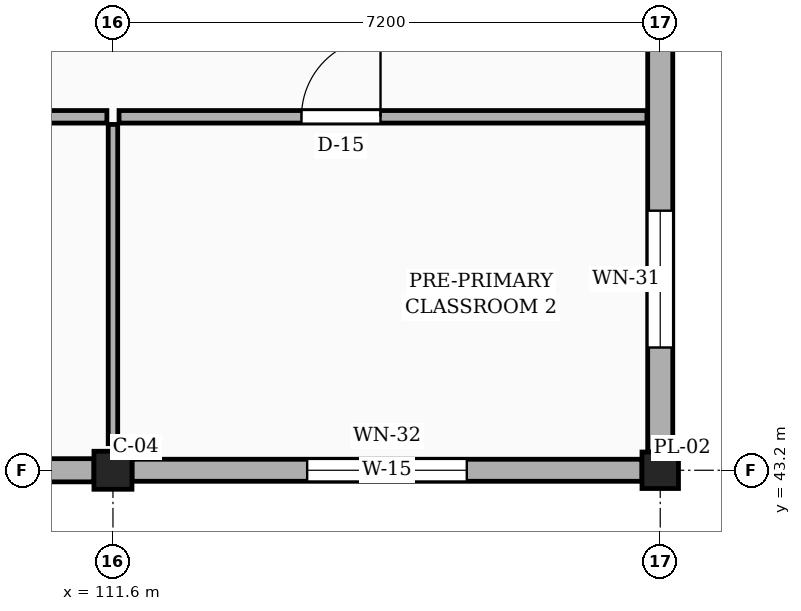
"""IFC4 building model, lengths in metres.
Left out: names, types, materials, properties, quantities, classifications, styles, units other than length and angle.
Written with IfcOpenShell. Run it as: python <this file> out.ifc"""

import sys

from ifc_helpers import new_model, si_unit, direction, frame, frame_2d, origin, origin_2d, place, context, subcontext, project, spatial, rectangle, extrude, element, fill, save


model = new_model("IFC4")
c1 = context("Model", 3, precision=1e-05, world=origin(), true_north=direction((0.0, 1.0)))
c2 = subcontext(c1, "Body", "Model", "MODEL_VIEW")
j1 = project(units=[si_unit("LENGTHUNIT", "METRE"), si_unit("PLANEANGLEUNIT", "RADIAN")], contexts=[c1])
p1 = place(None, origin())
s1 = spatial("IfcSite", under=j1, at=p1, CompositionType="ELEMENT")
p2 = place(p1, origin())
s2 = spatial("IfcBuilding", under=s1, at=p2, CompositionType="ELEMENT")
p3 = place(p2, origin())
s3 = spatial("IfcBuildingStorey", under=s2, at=p3, CompositionType="ELEMENT", Elevation=0.0)
p4 = place(p3, frame((111.6, 43.2, 0.0), z_axis=(0.0, 0.0, 1.0), x_axis=(1.0, 0.0, 0.0)))
e1 = element("IfcColumn", 1, at=p4, inside=s3, PredefinedType="COLUMN", context=c2, shape_type="SweptSolid", body=[
    extrude(rectangle(XDim=0.5, YDim=0.5, at=origin_2d()), origin(), (0.0, 0.0, 1.0), 4.5),
])
p5 = place(p3, frame((118.8, 43.2, 0.0), z_axis=(0.0, 0.0, 1.0), x_axis=(1.0, 0.0, 0.0)))
e2 = element("IfcColumn", 2, at=p5, inside=s3, PredefinedType="PILASTER", context=c2, shape_type="SweptSolid", body=[
    extrude(rectangle(XDim=0.48, YDim=0.48, at=origin_2d()), origin(), (0.0, 0.0, 1.0), 4.5),
])
p6 = place(p3, frame((104.65, 43.2, 0.0), z_axis=(0.0, 0.0, 1.0), x_axis=(1.0, 0.0, 0.0)))
e3 = element("IfcWall", 3, at=p6, inside=s3, PredefinedType="SOLIDWALL", context=c2, shape_type="SweptSolid", body=[
    extrude(rectangle(XDim=6.7, YDim=0.305, at=frame_2d((3.35, 0.0))), origin(), (0.0, 0.0, 1.0), 3.83),
])
p7 = place(p6, frame((2.45, 0.0, 0.85)))
e4 = element("IfcOpeningElement", 4, at=p7, cuts=e3, PredefinedType="OPENING", context=c2, shape_type="SweptSolid", body=[
    extrude(rectangle(XDim=1.8, YDim=2.1, at=frame_2d((0.9, 1.05))), frame((0.0, 0.163, 0.0), z_axis=(0.0, -1.0, 0.0), x_axis=(1.0, 0.0, 0.0)), (0.0, 0.0, 1.0), 0.325),
])
p8 = place(p3, frame((111.85, 43.2, 0.0), z_axis=(0.0, 0.0, 1.0), x_axis=(1.0, 0.0, 0.0)))
e5 = element("IfcWall", 5, at=p8, inside=s3, PredefinedType="SOLIDWALL", context=c2, shape_type="SweptSolid", body=[
    extrude(rectangle(XDim=6.71, YDim=0.29, at=frame_2d((3.355, 0.0))), origin(), (0.0, 0.0, 1.0), 3.83),
])
p9 = place(p8, frame((2.305, 0.0, 0.85)))
e6 = element("IfcOpeningElement", 6, at=p9, cuts=e5, PredefinedType="OPENING", context=c2, shape_type="SweptSolid", body=[
    extrude(rectangle(XDim=2.1, YDim=2.1, at=frame_2d((1.05, 1.05))), frame((0.0, 0.155, 0.0), z_axis=(0.0, -1.0, 0.0), x_axis=(1.0, 0.0, 0.0)), (0.0, 0.0, 1.0), 0.31),
])
p10 = place(p3, frame((118.8, 43.44, 0.0), z_axis=(0.0, 0.0, 1.0), x_axis=(0.0, 1.0, 0.0)))
e7 = element("IfcWall", 7, at=p10, inside=s3, PredefinedType="SOLIDWALL", context=c2, shape_type="SweptSolid", body=[
    extrude(rectangle(XDim=6.71, YDim=0.33, at=frame_2d((3.355, 0.0))), origin(), (0.0, 0.0, 1.0), 3.83),
])
p11 = place(p10, frame((1.375, 0.0, 0.85)))
e8 = element("IfcOpeningElement", 8, at=p11, cuts=e7, PredefinedType="OPENING", context=c2, shape_type="SweptSolid", body=[
    extrude(rectangle(XDim=1.8, YDim=2.1, at=frame_2d((0.9, 1.05))), frame((0.0, 0.175, 0.0), z_axis=(0.0, -1.0, 0.0), x_axis=(1.0, 0.0, 0.0)), (0.0, 0.0, 1.0), 0.35),
])
p12 = place(p3, frame((104.48, 47.85, 0.0), z_axis=(0.0, 0.0, 1.0), x_axis=(1.0, 0.0, 0.0)))
e9 = element("IfcWall", 9, at=p12, inside=s3, PredefinedType="PARTITIONING", context=c2, shape_type="SweptSolid", body=[
    extrude(rectangle(XDim=7.04, YDim=0.165, at=frame_2d((3.52, 0.0))), origin(), (0.0, 0.0, 1.0), 3.41),
])
p13 = place(p12, frame((2.4, 0.0, 0.0)))
e10 = element("IfcOpeningElement", 10, at=p13, cuts=e9, PredefinedType="OPENING", context=c2, shape_type="SweptSolid", body=[
    extrude(rectangle(XDim=1.04, YDim=2.12, at=frame_2d((0.52, 1.06))), frame((0.0, 0.093, 0.0), z_axis=(0.0, -1.0, 0.0), x_axis=(1.0, 0.0, 0.0)), (0.0, 0.0, 1.0), 0.185),
])
p14 = place(p3, frame((111.68, 47.85, 0.0), z_axis=(0.0, 0.0, 1.0), x_axis=(1.0, 0.0, 0.0)))
e11 = element("IfcWall", 11, at=p14, inside=s3, PredefinedType="PARTITIONING", context=c2, shape_type="SweptSolid", body=[
    extrude(rectangle(XDim=6.945, YDim=0.165, at=frame_2d((3.473, 0.0))), origin(), (0.0, 0.0, 1.0), 3.41),
])
p15 = place(p14, frame((2.4, 0.0, 0.0)))
e12 = element("IfcOpeningElement", 12, at=p15, cuts=e11, PredefinedType="OPENING", context=c2, shape_type="SweptSolid", body=[
    extrude(rectangle(XDim=1.04, YDim=2.12, at=frame_2d((0.52, 1.06))), frame((0.0, 0.093, 0.0), z_axis=(0.0, -1.0, 0.0), x_axis=(1.0, 0.0, 0.0)), (0.0, 0.0, 1.0), 0.185),
])
p16 = place(p3, frame((111.6, 43.55, 0.0), z_axis=(0.0, 0.0, 1.0), x_axis=(0.0, 1.0, 0.0)))
e13 = element("IfcWall", 13, at=p16, inside=s3, PredefinedType="PARTITIONING", context=c2, shape_type="SweptSolid", body=[
    extrude(rectangle(XDim=4.2, YDim=0.125, at=frame_2d((2.1, 0.0))), origin(), (0.0, 0.0, 1.0), 3.41),
])
p17 = place(p9, origin())
e14 = element("IfcWindow", 14, at=p17, inside=s3, PartitioningType="SINGLE_PANEL", PredefinedType="WINDOW", context=c2, shape_type="SweptSolid", body=[
    extrude(rectangle(XDim=2.1, YDim=2.1, at=frame_2d((1.05, 1.05))), frame((0.0, 0.03, 0.0), z_axis=(0.0, -1.0, 0.0), x_axis=(1.0, 0.0, 0.0)), (0.0, 0.0, 1.0), 0.06),
])
fill(e6, e14)
p18 = place(p11, origin())
e15 = element("IfcWindow", 15, at=p18, inside=s3, PartitioningType="SINGLE_PANEL", PredefinedType="WINDOW", context=c2, shape_type="SweptSolid", body=[
    extrude(rectangle(XDim=1.8, YDim=2.1, at=frame_2d((0.9, 1.05))), frame((0.0, 0.03, 0.0), z_axis=(0.0, -1.0, 0.0), x_axis=(1.0, 0.0, 0.0)), (0.0, 0.0, 1.0), 0.06),
])
fill(e8, e15)
p19 = place(p15, origin())
e16 = element("IfcDoor", 16, at=p19, inside=s3, OperationType="SINGLE_SWING_RIGHT", PredefinedType="DOOR", context=c2, shape_type="SweptSolid", body=[
    extrude(rectangle(XDim=1.04, YDim=2.12, at=frame_2d((0.52, 1.06))), frame((0.0, 0.025, 0.0), z_axis=(0.0, -1.0, 0.0), x_axis=(1.0, 0.0, 0.0)), (0.0, 0.0, 1.0), 0.05),
])
fill(e12, e16)
save(model, sys.argv[1])
